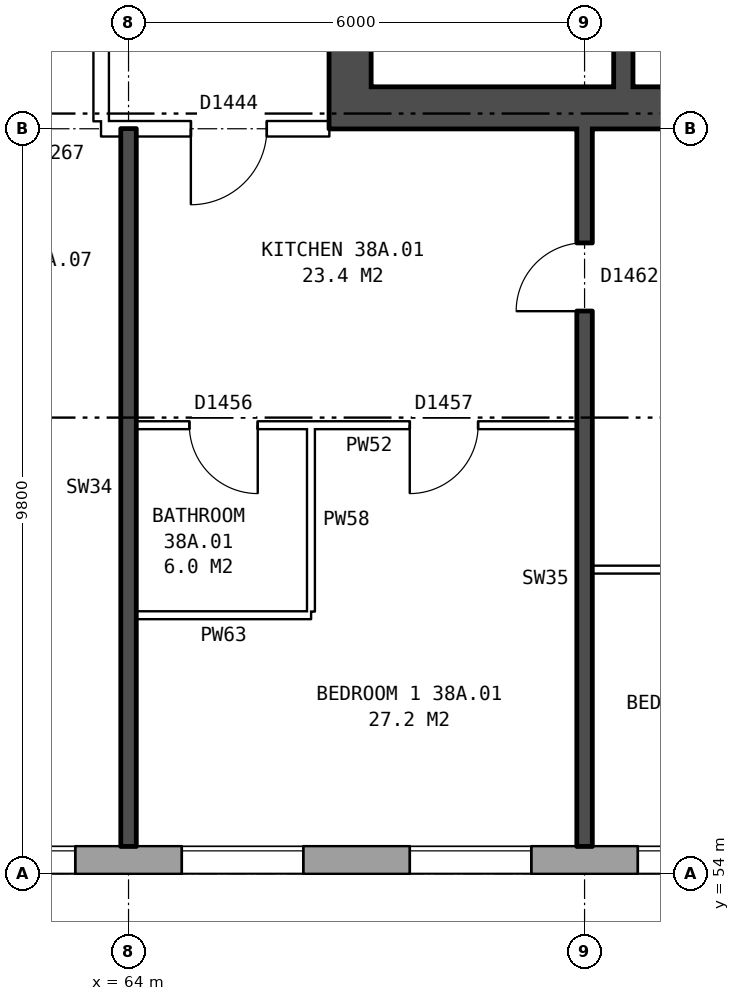
"""IFC4 building model, lengths in metres.
Left out: names, types, materials, properties, quantities, classifications, styles, units other than length and angle.
Written with IfcOpenShell. Run it as: python <this file> out.ifc"""

import sys

from ifc_helpers import new_model, si_unit, direction, frame, frame_2d, origin, place, context, subcontext, project, spatial, rectangle, extrude, element, fill, save


model = new_model("IFC4")
c1 = context("Model", 3, precision=1e-05, world=origin(), true_north=direction((0.0, 1.0)))
c2 = subcontext(c1, "Body", "Model", "MODEL_VIEW")
j1 = project(units=[si_unit("LENGTHUNIT", "METRE"), si_unit("PLANEANGLEUNIT", "RADIAN")], contexts=[c1])
p1 = place(None, origin())
s1 = spatial("IfcSite", under=j1, at=p1, CompositionType="ELEMENT")
p2 = place(p1, origin())
s2 = spatial("IfcBuilding", under=s1, at=p2, CompositionType="ELEMENT")
p3 = place(p2, frame((0.0, 0.0, 136.1)))
s3 = spatial("IfcBuildingStorey", under=s2, at=p3, CompositionType="ELEMENT", Elevation=136.1)
p4 = place(p3, frame((29.825, 54.18, 0.0), z_axis=(0.0, 0.0, 1.0), x_axis=(1.0, 0.0, 0.0)))
e1 = element("IfcWall", 1, at=p4, inside=s3, PredefinedType="STANDARD", context=c2, shape_type="SweptSolid", body=[
    extrude(rectangle(XDim=43.101, YDim=0.36, at=frame_2d((21.55, 0.0))), origin(), (0.0, 0.0, 1.0), 2.85),
])
p5 = place(p4, frame((1.875, 0.0, 0.8)))
e2 = element("IfcOpeningElement", 2, at=p5, cuts=e1, PredefinedType="OPENING", context=c2, shape_type="SweptSolid", body=[
    extrude(rectangle(XDim=1.6, YDim=1.8, at=frame_2d((0.8, 0.9))), frame((0.0, 0.19, 0.0), z_axis=(0.0, -1.0, 0.0), x_axis=(1.0, 0.0, 0.0)), (0.0, 0.0, 1.0), 0.38),
])
p6 = place(p4, frame((4.875, 0.0, 0.8)))
e3 = element("IfcOpeningElement", 3, at=p6, cuts=e1, PredefinedType="OPENING", context=c2, shape_type="SweptSolid", body=[
    extrude(rectangle(XDim=1.6, YDim=1.8, at=frame_2d((0.8, 0.9))), frame((0.0, 0.19, 0.0), z_axis=(0.0, -1.0, 0.0), x_axis=(1.0, 0.0, 0.0)), (0.0, 0.0, 1.0), 0.38),
])
p7 = place(p4, frame((7.875, 0.0, 0.8)))
e4 = element("IfcOpeningElement", 4, at=p7, cuts=e1, PredefinedType="OPENING", context=c2, shape_type="SweptSolid", body=[
    extrude(rectangle(XDim=1.6, YDim=1.8, at=frame_2d((0.8, 0.9))), frame((0.0, 0.19, 0.0), z_axis=(0.0, -1.0, 0.0), x_axis=(1.0, 0.0, 0.0)), (0.0, 0.0, 1.0), 0.38),
])
p8 = place(p4, frame((10.875, 0.0, 0.8)))
e5 = element("IfcOpeningElement", 5, at=p8, cuts=e1, PredefinedType="OPENING", context=c2, shape_type="SweptSolid", body=[
    extrude(rectangle(XDim=1.6, YDim=1.8, at=frame_2d((0.8, 0.9))), frame((0.0, 0.19, 0.0), z_axis=(0.0, -1.0, 0.0), x_axis=(1.0, 0.0, 0.0)), (0.0, 0.0, 1.0), 0.38),
])
p9 = place(p4, frame((13.875, 0.0, 0.8)))
e6 = element("IfcOpeningElement", 6, at=p9, cuts=e1, PredefinedType="OPENING", context=c2, shape_type="SweptSolid", body=[
    extrude(rectangle(XDim=1.6, YDim=1.8, at=frame_2d((0.8, 0.9))), frame((0.0, 0.19, 0.0), z_axis=(0.0, -1.0, 0.0), x_axis=(1.0, 0.0, 0.0)), (0.0, 0.0, 1.0), 0.38),
])
p10 = place(p4, frame((16.975, 0.0, 0.15)))
e7 = element("IfcOpeningElement", 7, at=p10, cuts=e1, PredefinedType="OPENING", context=c2, shape_type="SweptSolid", body=[
    extrude(rectangle(XDim=0.6, YDim=0.9, at=frame_2d((0.3, 0.45))), frame((0.0, 0.19, 0.0), z_axis=(0.0, -1.0, 0.0), x_axis=(1.0, 0.0, 0.0)), (0.0, 0.0, 1.0), 0.38),
])
p11 = place(p4, frame((19.875, 0.0, 0.8)))
e8 = element("IfcOpeningElement", 8, at=p11, cuts=e1, PredefinedType="OPENING", context=c2, shape_type="SweptSolid", body=[
    extrude(rectangle(XDim=1.6, YDim=1.8, at=frame_2d((0.8, 0.9))), frame((0.0, 0.19, 0.0), z_axis=(0.0, -1.0, 0.0), x_axis=(1.0, 0.0, 0.0)), (0.0, 0.0, 1.0), 0.38),
])
p12 = place(p4, frame((22.875, 0.0, 0.8)))
e9 = element("IfcOpeningElement", 9, at=p12, cuts=e1, PredefinedType="OPENING", context=c2, shape_type="SweptSolid", body=[
    extrude(rectangle(XDim=1.6, YDim=1.8, at=frame_2d((0.8, 0.9))), frame((0.0, 0.19, 0.0), z_axis=(0.0, -1.0, 0.0), x_axis=(1.0, 0.0, 0.0)), (0.0, 0.0, 1.0), 0.38),
])
p13 = place(p4, frame((25.325, 0.0, 0.15)))
e10 = element("IfcOpeningElement", 10, at=p13, cuts=e1, PredefinedType="OPENING", context=c2, shape_type="SweptSolid", body=[
    extrude(rectangle(XDim=0.8, YDim=0.9, at=frame_2d((0.4, 0.45))), frame((0.0, 0.19, 0.0), z_axis=(0.0, -1.0, 0.0), x_axis=(1.0, 0.0, 0.0)), (0.0, 0.0, 1.0), 0.38),
])
p14 = place(p4, frame((28.875, 0.0, 0.8)))
e11 = element("IfcOpeningElement", 11, at=p14, cuts=e1, PredefinedType="OPENING", context=c2, shape_type="SweptSolid", body=[
    extrude(rectangle(XDim=1.6, YDim=1.8, at=frame_2d((0.8, 0.9))), frame((0.0, 0.19, 0.0), z_axis=(0.0, -1.0, 0.0), x_axis=(1.0, 0.0, 0.0)), (0.0, 0.0, 1.0), 0.38),
])
p15 = place(p4, frame((31.875, 0.0, 0.8)))
e12 = element("IfcOpeningElement", 12, at=p15, cuts=e1, PredefinedType="OPENING", context=c2, shape_type="SweptSolid", body=[
    extrude(rectangle(XDim=1.6, YDim=1.8, at=frame_2d((0.8, 0.9))), frame((0.0, 0.19, 0.0), z_axis=(0.0, -1.0, 0.0), x_axis=(1.0, 0.0, 0.0)), (0.0, 0.0, 1.0), 0.38),
])
p16 = place(p4, frame((34.875, 0.0, 0.8)))
e13 = element("IfcOpeningElement", 13, at=p16, cuts=e1, PredefinedType="OPENING", context=c2, shape_type="SweptSolid", body=[
    extrude(rectangle(XDim=1.6, YDim=1.8, at=frame_2d((0.8, 0.9))), frame((0.0, 0.19, 0.0), z_axis=(0.0, -1.0, 0.0), x_axis=(1.0, 0.0, 0.0)), (0.0, 0.0, 1.0), 0.38),
])
p17 = place(p4, frame((37.875, 0.0, 0.8)))
e14 = element("IfcOpeningElement", 14, at=p17, cuts=e1, PredefinedType="OPENING", context=c2, shape_type="SweptSolid", body=[
    extrude(rectangle(XDim=1.6, YDim=1.8, at=frame_2d((0.8, 0.9))), frame((0.0, 0.19, 0.0), z_axis=(0.0, -1.0, 0.0), x_axis=(1.0, 0.0, 0.0)), (0.0, 0.0, 1.0), 0.38),
])
p18 = place(p4, frame((40.875, 0.0, 0.8)))
e15 = element("IfcOpeningElement", 15, at=p18, cuts=e1, PredefinedType="OPENING", context=c2, shape_type="SweptSolid", body=[
    extrude(rectangle(XDim=1.6, YDim=1.8, at=frame_2d((0.8, 0.9))), frame((0.0, 0.19, 0.0), z_axis=(0.0, -1.0, 0.0), x_axis=(1.0, 0.0, 0.0)), (0.0, 0.0, 1.0), 0.38),
])
p19 = place(p4, frame((17.925, 0.0, 0.15)))
e16 = element("IfcOpeningElement", 16, at=p19, cuts=e1, PredefinedType="OPENING", context=c2, shape_type="SweptSolid", body=[
    extrude(rectangle(XDim=1.0, YDim=1.8, at=frame_2d((0.5, 0.9))), frame((0.0, 0.19, 0.0), z_axis=(0.0, -1.0, 0.0), x_axis=(1.0, 0.0, 0.0)), (0.0, 0.0, 1.0), 0.38),
])
p20 = place(p4, frame((26.975, 0.0, 1.35)))
e17 = element("IfcOpeningElement", 17, at=p20, cuts=e1, PredefinedType="OPENING", context=c2, shape_type="SweptSolid", body=[
    extrude(rectangle(XDim=1.0, YDim=1.2, at=frame_2d((0.5, 0.6))), frame((0.0, 0.19, 0.0), z_axis=(0.0, -1.0, 0.0), x_axis=(1.0, 0.0, 0.0)), (0.0, 0.0, 1.0), 0.38),
])
p21 = place(p3, frame((66.915, 63.8, 0.0), z_axis=(0.0, 0.0, 1.0), x_axis=(0.0, 1.0, 0.0)))
e18 = element("IfcWall", 18, at=p21, inside=s3, PredefinedType="SHEAR", context=c2, shape_type="SweptSolid", body=[
    extrude(rectangle(XDim=12.4, YDim=0.55, at=frame_2d((6.2, 0.0))), origin(), (0.0, 0.0, 1.0), 2.85),
])
p22 = place(p21, frame((1.325, 0.0, 0.0)))
e19 = element("IfcOpeningElement", 19, at=p22, cuts=e18, PredefinedType="OPENING", context=c2, shape_type="SweptSolid", body=[
    extrude(rectangle(XDim=1.1, YDim=2.1, at=frame_2d((0.55, 1.05))), frame((0.0, 0.285, 0.0), z_axis=(0.0, -1.0, 0.0), x_axis=(1.0, 0.0, 0.0)), (0.0, 0.0, 1.0), 0.57),
])
p23 = place(p21, frame((3.6, 0.0, 0.0)))
e20 = element("IfcOpeningElement", 20, at=p23, cuts=e18, PredefinedType="OPENING", context=c2, shape_type="SweptSolid", body=[
    extrude(rectangle(XDim=1.1, YDim=2.1, at=frame_2d((0.55, 1.05))), frame((0.0, 0.285, 0.0), z_axis=(0.0, -1.0, 0.0), x_axis=(1.0, 0.0, 0.0)), (0.0, 0.0, 1.0), 0.57),
])
p24 = place(p21, frame((5.8, 0.0, 0.0)))
e21 = element("IfcOpeningElement", 21, at=p24, cuts=e18, PredefinedType="OPENING", context=c2, shape_type="SweptSolid", body=[
    extrude(rectangle(XDim=1.1, YDim=2.1, at=frame_2d((0.55, 1.05))), frame((0.0, 0.285, 0.0), z_axis=(0.0, -1.0, 0.0), x_axis=(1.0, 0.0, 0.0)), (0.0, 0.0, 1.0), 0.57),
])
p25 = place(p21, frame((8.0, 0.0, 0.0)))
e22 = element("IfcOpeningElement", 22, at=p25, cuts=e18, PredefinedType="OPENING", context=c2, shape_type="SweptSolid", body=[
    extrude(rectangle(XDim=1.1, YDim=2.1, at=frame_2d((0.55, 1.05))), frame((0.0, 0.285, 0.0), z_axis=(0.0, -1.0, 0.0), x_axis=(1.0, 0.0, 0.0)), (0.0, 0.0, 1.0), 0.57),
])
p26 = place(p21, frame((9.9, 0.0, 0.0)))
e23 = element("IfcOpeningElement", 23, at=p26, cuts=e18, PredefinedType="OPENING", context=c2, shape_type="SweptSolid", body=[
    extrude(rectangle(XDim=1.1, YDim=2.1, at=frame_2d((0.55, 1.05))), frame((0.0, 0.285, 0.0), z_axis=(0.0, -1.0, 0.0), x_axis=(1.0, 0.0, 0.0)), (0.0, 0.0, 1.0), 0.57),
])
p27 = place(p3, frame((67.19, 64.075, 0.0), z_axis=(0.0, 0.0, 1.0), x_axis=(1.0, 0.0, 0.0)))
e24 = element("IfcWall", 24, at=p27, inside=s3, PredefinedType="SHEAR", context=c2, shape_type="SweptSolid", body=[
    extrude(rectangle(XDim=7.9, YDim=0.55, at=frame_2d((3.95, 0.0))), origin(), (0.0, 0.0, 1.0), 2.85),
])
p28 = place(p3, frame((70.51, 64.35, 0.0), z_axis=(0.0, 0.0, 1.0), x_axis=(0.0, 1.0, 0.0)))
e25 = element("IfcWall", 25, at=p28, inside=s3, PredefinedType="SHEAR", context=c2, shape_type="SweptSolid", body=[
    extrude(rectangle(XDim=2.375, YDim=0.25, at=frame_2d((1.188, 0.0))), origin(), (0.0, 0.0, 1.0), 2.85),
])
p29 = place(p3, frame((63.64, 63.9, 0.0), z_axis=(0.0, 0.0, 1.0), x_axis=(0.0, 1.0, 0.0)))
e26 = element("IfcWall", 26, at=p29, inside=s3, PredefinedType="PARTITIONING", context=c2, shape_type="SweptSolid", body=[
    extrude(rectangle(XDim=12.2, YDim=0.2, at=frame_2d((6.1, 0.0))), origin(), (0.0, 0.0, 1.0), 2.85),
])
p30 = place(p29, frame((5.1, 0.0, 0.0)))
e27 = element("IfcOpeningElement", 27, at=p30, cuts=e26, PredefinedType="OPENING", context=c2, shape_type="SweptSolid", body=[
    extrude(rectangle(XDim=2.0, YDim=2.1, at=frame_2d((1.0, 1.05))), frame((0.0, 0.11, 0.0), z_axis=(0.0, -1.0, 0.0), x_axis=(1.0, 0.0, 0.0)), (0.0, 0.0, 1.0), 0.22),
])
p31 = place(p3, frame((64.1, 57.4, 0.0), z_axis=(0.0, 0.0, 1.0), x_axis=(1.0, 0.0, 0.0)))
e28 = element("IfcWall", 28, at=p31, inside=s3, PredefinedType="PARTITIONING", context=c2, shape_type="SweptSolid", body=[
    extrude(rectangle(XDim=2.3, YDim=0.1, at=frame_2d((1.15, 0.0))), origin(), (0.0, 0.0, 1.0), 2.85),
])
p32 = place(p3, frame((70.1, 58.0, 0.0), z_axis=(0.0, 0.0, 1.0), x_axis=(1.0, 0.0, 0.0)))
e29 = element("IfcWall", 29, at=p32, inside=s3, PredefinedType="PARTITIONING", context=c2, shape_type="SweptSolid", body=[
    extrude(rectangle(XDim=5.54, YDim=0.1, at=frame_2d((2.77, 0.0))), origin(), (0.0, 0.0, 1.0), 2.85),
])
p33 = place(p32, frame((2.32, 0.0, 0.0)))
e30 = element("IfcOpeningElement", 30, at=p33, cuts=e29, PredefinedType="OPENING", context=c2, shape_type="SweptSolid", body=[
    extrude(rectangle(XDim=0.9, YDim=2.1, at=frame_2d((0.45, 1.05))), frame((0.0, 0.06, 0.0), z_axis=(0.0, -1.0, 0.0), x_axis=(1.0, 0.0, 0.0)), (0.0, 0.0, 1.0), 0.12),
])
p34 = place(p3, frame((64.1, 59.9, 0.0), z_axis=(0.0, 0.0, 1.0), x_axis=(1.0, 0.0, 0.0)))
e31 = element("IfcWall", 31, at=p34, inside=s3, PredefinedType="PARTITIONING", context=c2, shape_type="SweptSolid", body=[
    extrude(rectangle(XDim=5.8, YDim=0.1, at=frame_2d((2.9, 0.0))), origin(), (0.0, 0.0, 1.0), 2.85),
])
p35 = place(p34, frame((3.6, 0.0, 0.0)))
e32 = element("IfcOpeningElement", 32, at=p35, cuts=e31, PredefinedType="OPENING", context=c2, shape_type="SweptSolid", body=[
    extrude(rectangle(XDim=0.9, YDim=2.1, at=frame_2d((0.45, 1.05))), frame((0.0, 0.06, 0.0), z_axis=(0.0, -1.0, 0.0), x_axis=(1.0, 0.0, 0.0)), (0.0, 0.0, 1.0), 0.12),
])
p36 = place(p34, frame((0.7, 0.0, 0.0)))
e33 = element("IfcOpeningElement", 33, at=p36, cuts=e31, PredefinedType="OPENING", context=c2, shape_type="SweptSolid", body=[
    extrude(rectangle(XDim=0.9, YDim=2.1, at=frame_2d((0.45, 1.05))), frame((0.0, 0.06, 0.0), z_axis=(0.0, -1.0, 0.0), x_axis=(1.0, 0.0, 0.0)), (0.0, 0.0, 1.0), 0.12),
])
p37 = place(p3, frame((63.64, 63.8, 0.0), z_axis=(0.0, 0.0, 1.0), x_axis=(1.0, 0.0, 0.0)))
e34 = element("IfcWall", 34, at=p37, inside=s3, PredefinedType="PARTITIONING", context=c2, shape_type="SweptSolid", body=[
    extrude(rectangle(XDim=3.0, YDim=0.2, at=frame_2d((1.5, 0.0))), origin(), (0.0, 0.0, 1.0), 2.85),
])
p38 = place(p37, frame((1.18, 0.0, 0.0)))
e35 = element("IfcOpeningElement", 35, at=p38, cuts=e34, PredefinedType="OPENING", context=c2, shape_type="SweptSolid", body=[
    extrude(rectangle(XDim=1.0, YDim=2.1, at=frame_2d((0.5, 1.05))), frame((0.0, 0.11, 0.0), z_axis=(0.0, -1.0, 0.0), x_axis=(1.0, 0.0, 0.0)), (0.0, 0.0, 1.0), 0.22),
])
p39 = place(p3, frame((64.0, 54.36, 0.0), z_axis=(0.0, 0.0, 1.0), x_axis=(0.0, 1.0, 0.0)))
e36 = element("IfcWall", 36, at=p39, inside=s3, PredefinedType="SOLIDWALL", context=c2, shape_type="SweptSolid", body=[
    extrude(rectangle(XDim=9.44, YDim=0.2, at=frame_2d((4.72, 0.0))), origin(), (0.0, 0.0, 1.0), 2.85),
])
p40 = place(p3, frame((66.4, 57.45, 0.0), z_axis=(0.0, 0.0, 1.0), x_axis=(0.0, 1.0, 0.0)))
e37 = element("IfcWall", 37, at=p40, inside=s3, PredefinedType="PARTITIONING", context=c2, shape_type="SweptSolid", body=[
    extrude(rectangle(XDim=2.4, YDim=0.1, at=frame_2d((1.2, 0.0))), origin(), (0.0, 0.0, 1.0), 2.85),
])
p41 = place(p3, frame((70.0, 54.36, 0.0), z_axis=(0.0, 0.0, 1.0), x_axis=(0.0, 1.0, 0.0)))
e38 = element("IfcWall", 38, at=p41, inside=s3, PredefinedType="SOLIDWALL", context=c2, shape_type="SweptSolid", body=[
    extrude(rectangle(XDim=9.44, YDim=0.2, at=frame_2d((4.72, 0.0))), origin(), (0.0, 0.0, 1.0), 2.85),
])
p42 = place(p41, frame((7.04, 0.0, 0.0)))
e39 = element("IfcOpeningElement", 39, at=p42, cuts=e38, PredefinedType="OPENING", context=c2, shape_type="SweptSolid", body=[
    extrude(rectangle(XDim=0.9, YDim=2.1, at=frame_2d((0.45, 1.05))), frame((0.0, 0.11, 0.0), z_axis=(0.0, -1.0, 0.0), x_axis=(1.0, 0.0, 0.0)), (0.0, 0.0, 1.0), 0.22),
])
p43 = place(p15, origin())
e40 = element("IfcWindow", 40, at=p43, inside=s3, PartitioningType="SINGLE_PANEL", PredefinedType="WINDOW", context=c2, shape_type="SweptSolid", body=[
    extrude(rectangle(XDim=1.6, YDim=1.8, at=frame_2d((0.8, 0.9))), frame((0.0, 0.15, 0.0), z_axis=(0.0, -1.0, 0.0), x_axis=(1.0, 0.0, 0.0)), (0.0, 0.0, 1.0), 0.06),
])
fill(e12, e40)
p44 = place(p16, origin())
e41 = element("IfcWindow", 41, at=p44, inside=s3, PartitioningType="SINGLE_PANEL", PredefinedType="WINDOW", context=c2, shape_type="SweptSolid", body=[
    extrude(rectangle(XDim=1.6, YDim=1.8, at=frame_2d((0.8, 0.9))), frame((0.0, 0.15, 0.0), z_axis=(0.0, -1.0, 0.0), x_axis=(1.0, 0.0, 0.0)), (0.0, 0.0, 1.0), 0.06),
])
fill(e13, e41)
p45 = place(p17, origin())
e42 = element("IfcWindow", 42, at=p45, inside=s3, PartitioningType="SINGLE_PANEL", PredefinedType="WINDOW", context=c2, shape_type="SweptSolid", body=[
    extrude(rectangle(XDim=1.6, YDim=1.8, at=frame_2d((0.8, 0.9))), frame((0.0, 0.15, 0.0), z_axis=(0.0, -1.0, 0.0), x_axis=(1.0, 0.0, 0.0)), (0.0, 0.0, 1.0), 0.06),
])
fill(e14, e42)
p46 = place(p18, origin())
e43 = element("IfcWindow", 43, at=p46, inside=s3, PartitioningType="SINGLE_PANEL", PredefinedType="WINDOW", context=c2, shape_type="SweptSolid", body=[
    extrude(rectangle(XDim=1.6, YDim=1.8, at=frame_2d((0.8, 0.9))), frame((0.0, 0.15, 0.0), z_axis=(0.0, -1.0, 0.0), x_axis=(1.0, 0.0, 0.0)), (0.0, 0.0, 1.0), 0.06),
])
fill(e15, e43)
p47 = place(p35, frame((0.9, 0.0, 0.0), z_axis=(0.0, 0.0, 1.0), x_axis=(-1.0, 0.0, 0.0)))
e44 = element("IfcDoor", 44, at=p47, inside=s3, OperationType="SINGLE_SWING_RIGHT", PredefinedType="DOOR", context=c2, shape_type="SweptSolid", body=[
    extrude(rectangle(XDim=0.9, YDim=2.1, at=frame_2d((0.45, 1.05))), frame((0.0, 0.025, 0.0), z_axis=(0.0, -1.0, 0.0), x_axis=(1.0, 0.0, 0.0)), (0.0, 0.0, 1.0), 0.05),
])
fill(e32, e44)
p48 = place(p38, frame((1.0, 0.0, 0.0), z_axis=(0.0, 0.0, 1.0), x_axis=(-1.0, 0.0, 0.0)))
e45 = element("IfcDoor", 45, at=p48, inside=s3, OperationType="SINGLE_SWING_RIGHT", PredefinedType="DOOR", context=c2, shape_type="SweptSolid", body=[
    extrude(rectangle(XDim=1.0, YDim=2.1, at=frame_2d((0.5, 1.05))), frame((0.0, 0.025, 0.0), z_axis=(0.0, -1.0, 0.0), x_axis=(1.0, 0.0, 0.0)), (0.0, 0.0, 1.0), 0.05),
])
fill(e35, e45)
p49 = place(p42, origin())
e46 = element("IfcDoor", 46, at=p49, inside=s3, OperationType="SINGLE_SWING_LEFT", PredefinedType="DOOR", context=c2, shape_type="SweptSolid", body=[
    extrude(rectangle(XDim=0.9, YDim=2.1, at=frame_2d((0.45, 1.05))), frame((0.0, 0.025, 0.0), z_axis=(0.0, -1.0, 0.0), x_axis=(1.0, 0.0, 0.0)), (0.0, 0.0, 1.0), 0.05),
])
fill(e39, e46)
p50 = place(p36, frame((0.9, 0.0, 0.0), z_axis=(0.0, 0.0, 1.0), x_axis=(-1.0, 0.0, 0.0)))
e47 = element("IfcDoor", 47, at=p50, inside=s3, OperationType="SINGLE_SWING_LEFT", PredefinedType="DOOR", context=c2, shape_type="SweptSolid", body=[
    extrude(rectangle(XDim=0.9, YDim=2.1, at=frame_2d((0.45, 1.05))), frame((0.0, 0.025, 0.0), z_axis=(0.0, -1.0, 0.0), x_axis=(1.0, 0.0, 0.0)), (0.0, 0.0, 1.0), 0.05),
])
fill(e33, e47)
save(model, sys.argv[1])
